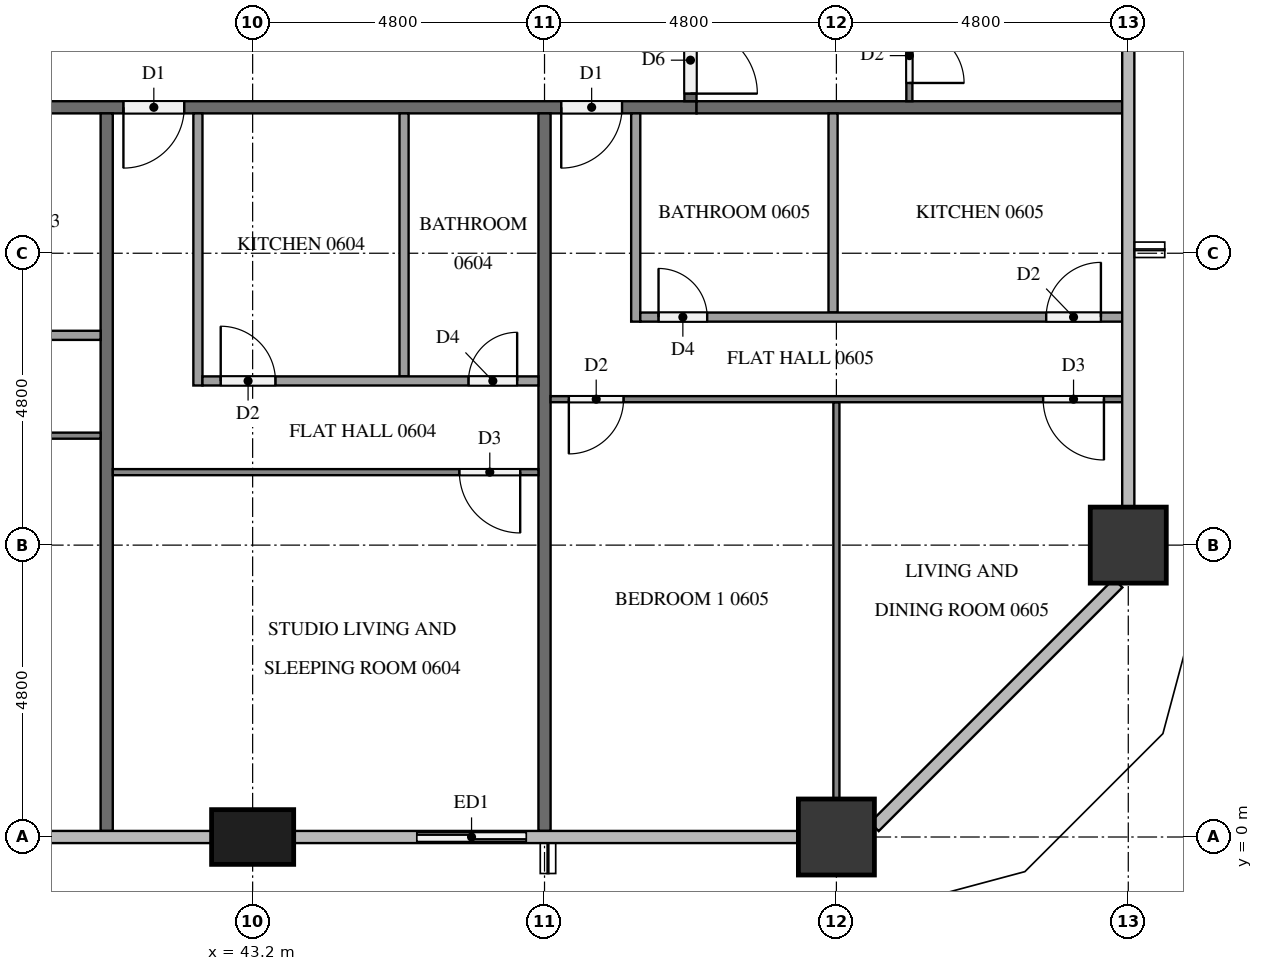
"""IFC4 building model, lengths in metres.
Left out: names, types, materials, properties, quantities, classifications, styles, units other than length and angle.
Written with IfcOpenShell. Run it as: python <this file> out.ifc"""

import sys

from ifc_helpers import new_model, si_unit, direction, frame, frame_2d, origin, origin_2d, place, context, subcontext, project, spatial, rectangle, extrude, element, fill, save


model = new_model("IFC4")
c1 = context("Model", 3, precision=1e-05, world=origin(), true_north=direction((0.0, 1.0)))
c2 = subcontext(c1, "Body", "Model", "MODEL_VIEW")
j1 = project(units=[si_unit("LENGTHUNIT", "METRE"), si_unit("PLANEANGLEUNIT", "RADIAN")], contexts=[c1])
p1 = place(None, origin())
s1 = spatial("IfcSite", under=j1, at=p1, CompositionType="ELEMENT")
p2 = place(p1, origin())
s2 = spatial("IfcBuilding", under=s1, at=p2, CompositionType="ELEMENT")
p3 = place(p2, frame((0.0, 0.0, 29.4)))
s3 = spatial("IfcBuildingStorey", under=s2, at=p3, CompositionType="ELEMENT", Elevation=29.4)
p4 = place(p3, frame((43.2, 0.0, 0.0), z_axis=(0.0, 0.0, 1.0), x_axis=(1.0, 0.0, 0.0)))
e1 = element("IfcColumn", 1, at=p4, inside=s3, PredefinedType="COLUMN", context=c2, shape_type="SweptSolid", body=[
    extrude(rectangle(XDim=1.35, YDim=0.9, at=origin_2d()), origin(), (0.0, 0.0, 1.0), 3.2),
])
for number, where, z_axis, x_axis in (
    (2, (52.8, 0.0, 0.0), (0.0, 0.0, 1.0), (1.0, 0.0, 0.0)),
    (3, (57.6, 4.8, 0.0), (0.0, 0.0, 1.0), (1.0, 0.0, 0.0)),
):
    element("IfcColumn", number, at=place(p3, frame(where, z_axis=z_axis, x_axis=x_axis)), inside=s3, PredefinedType="COLUMN", context=c2, shape_type="SweptSolid", body=[
        extrude(rectangle(XDim=1.25, YDim=1.25, at=origin_2d()), origin(), (0.0, 0.0, 1.0), 3.2),
    ])
p5 = place(p3, frame((45.6, 0.0, 0.0), z_axis=(0.0, 0.0, 1.0), x_axis=(1.0, 0.0, 0.0)))
e4 = element("IfcWall", 4, at=p5, inside=s3, PredefinedType="SOLIDWALL", context=c2, shape_type="SweptSolid", body=[
    extrude(rectangle(XDim=2.4, YDim=0.15, at=frame_2d((1.2, 0.0))), origin(), (0.0, 0.0, 1.0), 3.2),
])
p6 = place(p5, frame((0.3, 0.0, 0.0)))
e5 = element("IfcOpeningElement", 5, at=p6, cuts=e4, PredefinedType="OPENING", context=c2, shape_type="SweptSolid", body=[
    extrude(rectangle(XDim=1.8, YDim=2.4, at=frame_2d((0.9, 1.2))), frame((0.0, 0.085, 0.0), z_axis=(0.0, -1.0, 0.0), x_axis=(1.0, 0.0, 0.0)), (0.0, 0.0, 1.0), 0.17),
])
p7 = place(p3, frame((50.5, 12.0, 0.0), z_axis=(0.0, 0.0, 1.0), x_axis=(-1.0, 0.0, 0.0)))
e6 = element("IfcWall", 6, at=p7, inside=s3, PredefinedType="PARTITIONING", context=c2, shape_type="SweptSolid", body=[
    extrude(rectangle(XDim=38.6, YDim=0.2, at=frame_2d((19.3, 0.0))), origin(), (0.0, 0.0, 1.0), 3.2),
])
p8 = place(p7, frame((36.375, 0.0, 0.0)))
e7 = element("IfcOpeningElement", 7, at=p8, cuts=e6, PredefinedType="OPENING", context=c2, shape_type="SweptSolid", body=[
    extrude(rectangle(XDim=1.0, YDim=2.1, at=frame_2d((0.5, 1.05))), frame((0.0, 0.11, 0.0), z_axis=(0.0, -1.0, 0.0), x_axis=(1.0, 0.0, 0.0)), (0.0, 0.0, 1.0), 0.22),
])
p9 = place(p7, frame((34.825, 0.0, 0.0)))
e8 = element("IfcOpeningElement", 8, at=p9, cuts=e6, PredefinedType="OPENING", context=c2, shape_type="SweptSolid", body=[
    extrude(rectangle(XDim=1.0, YDim=2.1, at=frame_2d((0.5, 1.05))), frame((0.0, 0.11, 0.0), z_axis=(0.0, -1.0, 0.0), x_axis=(1.0, 0.0, 0.0)), (0.0, 0.0, 1.0), 0.22),
])
p10 = place(p7, frame((22.825, 0.0, 0.0)))
e9 = element("IfcOpeningElement", 9, at=p10, cuts=e6, PredefinedType="OPENING", context=c2, shape_type="SweptSolid", body=[
    extrude(rectangle(XDim=1.0, YDim=2.1, at=frame_2d((0.5, 1.05))), frame((0.0, 0.11, 0.0), z_axis=(0.0, -1.0, 0.0), x_axis=(1.0, 0.0, 0.0)), (0.0, 0.0, 1.0), 0.22),
])
p11 = place(p7, frame((8.425, 0.0, 0.0)))
e10 = element("IfcOpeningElement", 10, at=p11, cuts=e6, PredefinedType="OPENING", context=c2, shape_type="SweptSolid", body=[
    extrude(rectangle(XDim=1.0, YDim=2.1, at=frame_2d((0.5, 1.05))), frame((0.0, 0.11, 0.0), z_axis=(0.0, -1.0, 0.0), x_axis=(1.0, 0.0, 0.0)), (0.0, 0.0, 1.0), 0.22),
])
p12 = place(p7, frame((1.225, 0.0, 0.0)))
e11 = element("IfcOpeningElement", 11, at=p12, cuts=e6, PredefinedType="OPENING", context=c2, shape_type="SweptSolid", body=[
    extrude(rectangle(XDim=1.0, YDim=2.1, at=frame_2d((0.5, 1.05))), frame((0.0, 0.11, 0.0), z_axis=(0.0, -1.0, 0.0), x_axis=(1.0, 0.0, 0.0)), (0.0, 0.0, 1.0), 0.22),
])
p13 = place(p3, frame((50.4, 40.7, 0.0), z_axis=(0.0, 0.0, 1.0), x_axis=(0.0, -1.0, 0.0)))
e12 = element("IfcWall", 12, at=p13, inside=s3, PredefinedType="PARTITIONING", context=c2, shape_type="SweptSolid", body=[
    extrude(rectangle(XDim=28.6, YDim=0.2, at=frame_2d((14.3, 0.0))), origin(), (0.0, 0.0, 1.0), 3.2),
])
p14 = place(p13, frame((27.375, 0.0, 0.0)))
e13 = element("IfcOpeningElement", 13, at=p14, cuts=e12, PredefinedType="OPENING", context=c2, shape_type="SweptSolid", body=[
    extrude(rectangle(XDim=1.1, YDim=2.1, at=frame_2d((0.55, 1.05))), frame((0.0, 0.11, 0.0), z_axis=(0.0, -1.0, 0.0), x_axis=(1.0, 0.0, 0.0)), (0.0, 0.0, 1.0), 0.22),
])
p15 = place(p13, frame((8.225, 0.0, 0.0)))
e14 = element("IfcOpeningElement", 14, at=p15, cuts=e12, PredefinedType="OPENING", context=c2, shape_type="SweptSolid", body=[
    extrude(rectangle(XDim=1.0, YDim=2.1, at=frame_2d((0.5, 1.05))), frame((0.0, 0.11, 0.0), z_axis=(0.0, -1.0, 0.0), x_axis=(1.0, 0.0, 0.0)), (0.0, 0.0, 1.0), 0.22),
])
for number, where, z_axis, x_axis in (
    (15, (40.8, 11.9, 0.0), (0.0, 0.0, 1.0), (0.0, -1.0, 0.0)),
    (16, (48.0, 11.9, 0.0), (0.0, 0.0, 1.0), (0.0, -1.0, 0.0)),
):
    element("IfcWall", number, at=place(p3, frame(where, z_axis=z_axis, x_axis=x_axis)), inside=s3, PredefinedType="PARTITIONING", context=c2, shape_type="SweptSolid", body=[
        extrude(rectangle(XDim=11.8, YDim=0.2, at=frame_2d((5.9, 0.0))), origin(), (0.0, 0.0, 1.0), 3.2),
    ])
p16 = place(p3, frame((50.5, 12.0, 0.0), z_axis=(0.0, 0.0, 1.0), x_axis=(1.0, 0.0, 0.0)))
e17 = element("IfcWall", 17, at=p16, inside=s3, PredefinedType="PARTITIONING", context=c2, shape_type="SweptSolid", body=[
    extrude(rectangle(XDim=7.0, YDim=0.2, at=frame_2d((3.5, 0.0))), origin(), (0.0, 0.0, 1.0), 3.2),
])
p17 = place(p3, frame((40.7, 6.6, 0.0), z_axis=(0.0, 0.0, 1.0), x_axis=(-1.0, 0.0, 0.0)))
e18 = element("IfcWall", 18, at=p17, inside=s3, PredefinedType="PARTITIONING", context=c2, shape_type="SweptSolid", body=[
    extrude(rectangle(XDim=14.2, YDim=0.1, at=frame_2d((7.1, 0.0))), origin(), (0.0, 0.0, 1.0), 3.2),
])
p18 = place(p17, frame((13.0, 0.0, 0.0)))
e19 = element("IfcOpeningElement", 19, at=p18, cuts=e18, PredefinedType="OPENING", context=c2, shape_type="SweptSolid", body=[
    extrude(rectangle(XDim=0.9, YDim=2.1, at=frame_2d((0.45, 1.05))), frame((0.0, 0.06, 0.0), z_axis=(0.0, -1.0, 0.0), x_axis=(1.0, 0.0, 0.0)), (0.0, 0.0, 1.0), 0.12),
])
p19 = place(p17, frame((5.05, 0.0, 0.0)))
e20 = element("IfcOpeningElement", 20, at=p19, cuts=e18, PredefinedType="OPENING", context=c2, shape_type="SweptSolid", body=[
    extrude(rectangle(XDim=0.9, YDim=2.1, at=frame_2d((0.45, 1.05))), frame((0.0, 0.06, 0.0), z_axis=(0.0, -1.0, 0.0), x_axis=(1.0, 0.0, 0.0)), (0.0, 0.0, 1.0), 0.12),
])
p20 = place(p17, frame((3.35, 0.0, 0.0)))
e21 = element("IfcOpeningElement", 21, at=p20, cuts=e18, PredefinedType="OPENING", context=c2, shape_type="SweptSolid", body=[
    extrude(rectangle(XDim=1.0, YDim=2.1, at=frame_2d((0.5, 1.05))), frame((0.0, 0.06, 0.0), z_axis=(0.0, -1.0, 0.0), x_axis=(1.0, 0.0, 0.0)), (0.0, 0.0, 1.0), 0.12),
])
p21 = place(p3, frame((27.975, 8.25, 0.0), z_axis=(0.0, 0.0, 1.0), x_axis=(1.0, 0.0, 0.0)))
e22 = element("IfcWall", 22, at=p21, inside=s3, PredefinedType="PARTITIONING", context=c2, shape_type="SweptSolid", body=[
    extrude(rectangle(XDim=12.725, YDim=0.15, at=frame_2d((6.362, 0.0))), origin(), (0.0, 0.0, 1.0), 3.2),
])
p22 = place(p21, frame((0.3, 0.0, 0.0)))
e23 = element("IfcOpeningElement", 23, at=p22, cuts=e22, PredefinedType="OPENING", context=c2, shape_type="SweptSolid", body=[
    extrude(rectangle(XDim=0.9, YDim=2.1, at=frame_2d((0.45, 1.05))), frame((0.0, 0.085, 0.0), z_axis=(0.0, -1.0, 0.0), x_axis=(1.0, 0.0, 0.0)), (0.0, 0.0, 1.0), 0.17),
])
p23 = place(p21, frame((7.685, 0.0, 0.0)))
e24 = element("IfcOpeningElement", 24, at=p23, cuts=e22, PredefinedType="OPENING", context=c2, shape_type="SweptSolid", body=[
    extrude(rectangle(XDim=0.8, YDim=2.1, at=frame_2d((0.4, 1.05))), frame((0.0, 0.085, 0.0), z_axis=(0.0, -1.0, 0.0), x_axis=(1.0, 0.0, 0.0)), (0.0, 0.0, 1.0), 0.17),
])
p24 = place(p21, frame((9.135, 0.0, 0.0)))
e25 = element("IfcOpeningElement", 25, at=p24, cuts=e22, PredefinedType="OPENING", context=c2, shape_type="SweptSolid", body=[
    extrude(rectangle(XDim=0.9, YDim=2.1, at=frame_2d((0.45, 1.05))), frame((0.0, 0.085, 0.0), z_axis=(0.0, -1.0, 0.0), x_axis=(1.0, 0.0, 0.0)), (0.0, 0.0, 1.0), 0.17),
])
p25 = place(p3, frame((47.9, 6.0, 0.0), z_axis=(0.0, 0.0, 1.0), x_axis=(-1.0, 0.0, 0.0)))
e26 = element("IfcWall", 26, at=p25, inside=s3, PredefinedType="PARTITIONING", context=c2, shape_type="SweptSolid", body=[
    extrude(rectangle(XDim=7.0, YDim=0.1, at=frame_2d((3.5, 0.0))), origin(), (0.0, 0.0, 1.0), 3.2),
])
p26 = place(p25, frame((0.3, 0.0, 0.0)))
e27 = element("IfcOpeningElement", 27, at=p26, cuts=e26, PredefinedType="OPENING", context=c2, shape_type="SweptSolid", body=[
    extrude(rectangle(XDim=1.0, YDim=2.1, at=frame_2d((0.5, 1.05))), frame((0.0, 0.06, 0.0), z_axis=(0.0, -1.0, 0.0), x_axis=(1.0, 0.0, 0.0)), (0.0, 0.0, 1.0), 0.12),
])
p27 = place(p3, frame((45.69, 11.9, 0.0), z_axis=(0.0, 0.0, 1.0), x_axis=(0.0, -1.0, 0.0)))
e28 = element("IfcWall", 28, at=p27, inside=s3, PredefinedType="PARTITIONING", context=c2, shape_type="SweptSolid", body=[
    extrude(rectangle(XDim=4.325, YDim=0.15, at=frame_2d((2.163, 0.0))), origin(), (0.0, 0.0, 1.0), 3.2),
])
p28 = place(p3, frame((42.3, 11.9, 0.0), z_axis=(0.0, 0.0, 1.0), x_axis=(0.0, -1.0, 0.0)))
e29 = element("IfcWall", 29, at=p28, inside=s3, PredefinedType="PARTITIONING", context=c2, shape_type="SweptSolid", body=[
    extrude(rectangle(XDim=4.475, YDim=0.15, at=frame_2d((2.237, 0.0))), origin(), (0.0, 0.0, 1.0), 3.2),
])
p29 = place(p3, frame((42.375, 7.5, 0.0), z_axis=(0.0, 0.0, 1.0), x_axis=(1.0, 0.0, 0.0)))
e30 = element("IfcWall", 30, at=p29, inside=s3, PredefinedType="PARTITIONING", context=c2, shape_type="SweptSolid", body=[
    extrude(rectangle(XDim=5.525, YDim=0.15, at=frame_2d((2.762, 0.0))), origin(), (0.0, 0.0, 1.0), 3.2),
])
p30 = place(p29, frame((0.3, 0.0, 0.0)))
e31 = element("IfcOpeningElement", 31, at=p30, cuts=e30, PredefinedType="OPENING", context=c2, shape_type="SweptSolid", body=[
    extrude(rectangle(XDim=0.9, YDim=2.1, at=frame_2d((0.45, 1.05))), frame((0.0, 0.085, 0.0), z_axis=(0.0, -1.0, 0.0), x_axis=(1.0, 0.0, 0.0)), (0.0, 0.0, 1.0), 0.17),
])
p31 = place(p29, frame((4.375, 0.0, 0.0)))
e32 = element("IfcOpeningElement", 32, at=p31, cuts=e30, PredefinedType="OPENING", context=c2, shape_type="SweptSolid", body=[
    extrude(rectangle(XDim=0.8, YDim=2.1, at=frame_2d((0.4, 1.05))), frame((0.0, 0.085, 0.0), z_axis=(0.0, -1.0, 0.0), x_axis=(1.0, 0.0, 0.0)), (0.0, 0.0, 1.0), 0.17),
])
p32 = place(p3, frame((52.8, 7.15, 0.0), z_axis=(0.0, 0.0, 1.0), x_axis=(0.0, -1.0, 0.0)))
e33 = element("IfcWall", 33, at=p32, inside=s3, PredefinedType="PARTITIONING", context=c2, shape_type="SweptSolid", body=[
    extrude(rectangle(XDim=6.525, YDim=0.1, at=frame_2d((3.262, 0.0))), origin(), (0.0, 0.0, 1.0), 3.2),
])
p33 = place(p3, frame((57.5, 7.2, 0.0), z_axis=(0.0, 0.0, 1.0), x_axis=(-1.0, 0.0, 0.0)))
e34 = element("IfcWall", 34, at=p33, inside=s3, PredefinedType="PARTITIONING", context=c2, shape_type="SweptSolid", body=[
    extrude(rectangle(XDim=9.4, YDim=0.1, at=frame_2d((4.7, 0.0))), origin(), (0.0, 0.0, 1.0), 3.2),
])
p34 = place(p33, frame((8.2, 0.0, 0.0)))
e35 = element("IfcOpeningElement", 35, at=p34, cuts=e34, PredefinedType="OPENING", context=c2, shape_type="SweptSolid", body=[
    extrude(rectangle(XDim=0.9, YDim=2.1, at=frame_2d((0.45, 1.05))), frame((0.0, 0.06, 0.0), z_axis=(0.0, -1.0, 0.0), x_axis=(1.0, 0.0, 0.0)), (0.0, 0.0, 1.0), 0.12),
])
p35 = place(p33, frame((0.3, 0.0, 0.0)))
e36 = element("IfcOpeningElement", 36, at=p35, cuts=e34, PredefinedType="OPENING", context=c2, shape_type="SweptSolid", body=[
    extrude(rectangle(XDim=1.0, YDim=2.1, at=frame_2d((0.5, 1.05))), frame((0.0, 0.06, 0.0), z_axis=(0.0, -1.0, 0.0), x_axis=(1.0, 0.0, 0.0)), (0.0, 0.0, 1.0), 0.12),
])
p36 = place(p3, frame((52.745, 11.9, 0.0), z_axis=(0.0, 0.0, 1.0), x_axis=(0.0, -1.0, 0.0)))
e37 = element("IfcWall", 37, at=p36, inside=s3, PredefinedType="PARTITIONING", context=c2, shape_type="SweptSolid", body=[
    extrude(rectangle(XDim=3.275, YDim=0.15, at=frame_2d((1.637, 0.0))), origin(), (0.0, 0.0, 1.0), 3.2),
])
p37 = place(p3, frame((49.5, 11.9, 0.0), z_axis=(0.0, 0.0, 1.0), x_axis=(0.0, -1.0, 0.0)))
e38 = element("IfcWall", 38, at=p37, inside=s3, PredefinedType="PARTITIONING", context=c2, shape_type="SweptSolid", body=[
    extrude(rectangle(XDim=3.425, YDim=0.15, at=frame_2d((1.712, 0.0))), origin(), (0.0, 0.0, 1.0), 3.2),
])
p38 = place(p3, frame((49.575, 8.55, 0.0), z_axis=(0.0, 0.0, 1.0), x_axis=(1.0, 0.0, 0.0)))
e39 = element("IfcWall", 39, at=p38, inside=s3, PredefinedType="PARTITIONING", context=c2, shape_type="SweptSolid", body=[
    extrude(rectangle(XDim=7.925, YDim=0.15, at=frame_2d((3.962, 0.0))), origin(), (0.0, 0.0, 1.0), 3.2),
])
p39 = place(p38, frame((0.3, 0.0, 0.0)))
e40 = element("IfcOpeningElement", 40, at=p39, cuts=e39, PredefinedType="OPENING", context=c2, shape_type="SweptSolid", body=[
    extrude(rectangle(XDim=0.8, YDim=2.1, at=frame_2d((0.4, 1.05))), frame((0.0, 0.085, 0.0), z_axis=(0.0, -1.0, 0.0), x_axis=(1.0, 0.0, 0.0)), (0.0, 0.0, 1.0), 0.17),
])
p40 = place(p38, frame((6.675, 0.0, 0.0)))
e41 = element("IfcOpeningElement", 41, at=p40, cuts=e39, PredefinedType="OPENING", context=c2, shape_type="SweptSolid", body=[
    extrude(rectangle(XDim=0.9, YDim=2.1, at=frame_2d((0.45, 1.05))), frame((0.0, 0.085, 0.0), z_axis=(0.0, -1.0, 0.0), x_axis=(1.0, 0.0, 0.0)), (0.0, 0.0, 1.0), 0.17),
])
p41 = place(p3, frame((54.0, 31.1, 0.0), z_axis=(0.0, 0.0, 1.0), x_axis=(0.0, -1.0, 0.0)))
e42 = element("IfcWall", 42, at=p41, inside=s3, PredefinedType="PARTITIONING", context=c2, shape_type="SweptSolid", body=[
    extrude(rectangle(XDim=19.0, YDim=0.1, at=frame_2d((9.5, 0.0))), origin(), (0.0, 0.0, 1.0), 3.2),
])
p42 = place(p41, frame((17.8, 0.0, 0.0)))
e43 = element("IfcOpeningElement", 43, at=p42, cuts=e42, PredefinedType="OPENING", context=c2, shape_type="SweptSolid", body=[
    extrude(rectangle(XDim=0.9, YDim=2.1, at=frame_2d((0.45, 1.05))), frame((0.0, 0.06, 0.0), z_axis=(0.0, -1.0, 0.0), x_axis=(1.0, 0.0, 0.0)), (0.0, 0.0, 1.0), 0.12),
])
p43 = place(p41, frame((9.85, 0.0, 0.0)))
e44 = element("IfcOpeningElement", 44, at=p43, cuts=e42, PredefinedType="OPENING", context=c2, shape_type="SweptSolid", body=[
    extrude(rectangle(XDim=0.9, YDim=2.1, at=frame_2d((0.45, 1.05))), frame((0.0, 0.06, 0.0), z_axis=(0.0, -1.0, 0.0), x_axis=(1.0, 0.0, 0.0)), (0.0, 0.0, 1.0), 0.12),
])
p44 = place(p41, frame((8.15, 0.0, 0.0)))
e45 = element("IfcOpeningElement", 45, at=p44, cuts=e42, PredefinedType="OPENING", context=c2, shape_type="SweptSolid", body=[
    extrude(rectangle(XDim=1.0, YDim=2.1, at=frame_2d((0.5, 1.05))), frame((0.0, 0.06, 0.0), z_axis=(0.0, -1.0, 0.0), x_axis=(1.0, 0.0, 0.0)), (0.0, 0.0, 1.0), 0.12),
])
p45 = place(p41, frame((0.3, 0.0, 0.0)))
e46 = element("IfcOpeningElement", 46, at=p45, cuts=e42, PredefinedType="OPENING", context=c2, shape_type="SweptSolid", body=[
    extrude(rectangle(XDim=0.9, YDim=2.1, at=frame_2d((0.45, 1.05))), frame((0.0, 0.06, 0.0), z_axis=(0.0, -1.0, 0.0), x_axis=(1.0, 0.0, 0.0)), (0.0, 0.0, 1.0), 0.12),
])
p46 = place(p6, origin())
e47 = element("IfcDoor", 47, at=p46, inside=s3, OperationType="SLIDING_TO_LEFT", PredefinedType="DOOR", context=c2, shape_type="SweptSolid", body=[
    extrude(rectangle(XDim=1.8, YDim=2.4, at=frame_2d((0.9, 1.2))), frame((0.0, 0.025, 0.0), z_axis=(0.0, -1.0, 0.0), x_axis=(1.0, 0.0, 0.0)), (0.0, 0.0, 1.0), 0.05),
])
fill(e5, e47)
p47 = place(p11, origin())
e48 = element("IfcDoor", 48, at=p47, inside=s3, OperationType="SINGLE_SWING_RIGHT", PredefinedType="DOOR", context=c2, shape_type="SweptSolid", body=[
    extrude(rectangle(XDim=1.0, YDim=2.1, at=frame_2d((0.5, 1.05))), frame((0.0, 0.025, 0.0), z_axis=(0.0, -1.0, 0.0), x_axis=(1.0, 0.0, 0.0)), (0.0, 0.0, 1.0), 0.05),
])
fill(e10, e48)
p48 = place(p12, origin())
e49 = element("IfcDoor", 49, at=p48, inside=s3, OperationType="SINGLE_SWING_RIGHT", PredefinedType="DOOR", context=c2, shape_type="SweptSolid", body=[
    extrude(rectangle(XDim=1.0, YDim=2.1, at=frame_2d((0.5, 1.05))), frame((0.0, 0.025, 0.0), z_axis=(0.0, -1.0, 0.0), x_axis=(1.0, 0.0, 0.0)), (0.0, 0.0, 1.0), 0.05),
])
fill(e11, e49)
p49 = place(p14, origin())
e50 = element("IfcDoor", 50, at=p49, inside=s3, OperationType="SINGLE_SWING_RIGHT", PredefinedType="DOOR", context=c2, shape_type="SweptSolid", body=[
    extrude(rectangle(XDim=1.1, YDim=2.1, at=frame_2d((0.55, 1.05))), frame((0.0, 0.025, 0.0), z_axis=(0.0, -1.0, 0.0), x_axis=(1.0, 0.0, 0.0)), (0.0, 0.0, 1.0), 0.05),
])
fill(e13, e50)
p50 = place(p26, origin())
e51 = element("IfcDoor", 51, at=p50, inside=s3, OperationType="SINGLE_SWING_LEFT", PredefinedType="DOOR", context=c2, shape_type="SweptSolid", body=[
    extrude(rectangle(XDim=1.0, YDim=2.1, at=frame_2d((0.5, 1.05))), frame((0.0, 0.025, 0.0), z_axis=(0.0, -1.0, 0.0), x_axis=(1.0, 0.0, 0.0)), (0.0, 0.0, 1.0), 0.05),
])
fill(e27, e51)
p51 = place(p30, origin())
e52 = element("IfcDoor", 52, at=p51, inside=s3, OperationType="SINGLE_SWING_LEFT", PredefinedType="DOOR", context=c2, shape_type="SweptSolid", body=[
    extrude(rectangle(XDim=0.9, YDim=2.1, at=frame_2d((0.45, 1.05))), frame((0.0, 0.025, 0.0), z_axis=(0.0, -1.0, 0.0), x_axis=(1.0, 0.0, 0.0)), (0.0, 0.0, 1.0), 0.05),
])
fill(e31, e52)
p52 = place(p31, origin())
e53 = element("IfcDoor", 53, at=p52, inside=s3, OperationType="SINGLE_SWING_RIGHT", PredefinedType="DOOR", context=c2, shape_type="SweptSolid", body=[
    extrude(rectangle(XDim=0.8, YDim=2.1, at=frame_2d((0.4, 1.05))), frame((0.0, 0.025, 0.0), z_axis=(0.0, -1.0, 0.0), x_axis=(1.0, 0.0, 0.0)), (0.0, 0.0, 1.0), 0.05),
])
fill(e32, e53)
p53 = place(p34, origin())
e54 = element("IfcDoor", 54, at=p53, inside=s3, OperationType="SINGLE_SWING_RIGHT", PredefinedType="DOOR", context=c2, shape_type="SweptSolid", body=[
    extrude(rectangle(XDim=0.9, YDim=2.1, at=frame_2d((0.45, 1.05))), frame((0.0, 0.025, 0.0), z_axis=(0.0, -1.0, 0.0), x_axis=(1.0, 0.0, 0.0)), (0.0, 0.0, 1.0), 0.05),
])
fill(e35, e54)
p54 = place(p35, origin())
e55 = element("IfcDoor", 55, at=p54, inside=s3, OperationType="SINGLE_SWING_LEFT", PredefinedType="DOOR", context=c2, shape_type="SweptSolid", body=[
    extrude(rectangle(XDim=1.0, YDim=2.1, at=frame_2d((0.5, 1.05))), frame((0.0, 0.025, 0.0), z_axis=(0.0, -1.0, 0.0), x_axis=(1.0, 0.0, 0.0)), (0.0, 0.0, 1.0), 0.05),
])
fill(e36, e55)
p55 = place(p39, origin())
e56 = element("IfcDoor", 56, at=p55, inside=s3, OperationType="SINGLE_SWING_LEFT", PredefinedType="DOOR", context=c2, shape_type="SweptSolid", body=[
    extrude(rectangle(XDim=0.8, YDim=2.1, at=frame_2d((0.4, 1.05))), frame((0.0, 0.025, 0.0), z_axis=(0.0, -1.0, 0.0), x_axis=(1.0, 0.0, 0.0)), (0.0, 0.0, 1.0), 0.05),
])
fill(e40, e56)
p56 = place(p40, origin())
e57 = element("IfcDoor", 57, at=p56, inside=s3, OperationType="SINGLE_SWING_RIGHT", PredefinedType="DOOR", context=c2, shape_type="SweptSolid", body=[
    extrude(rectangle(XDim=0.9, YDim=2.1, at=frame_2d((0.45, 1.05))), frame((0.0, 0.025, 0.0), z_axis=(0.0, -1.0, 0.0), x_axis=(1.0, 0.0, 0.0)), (0.0, 0.0, 1.0), 0.05),
])
fill(e41, e57)
p57 = place(p42, origin())
e58 = element("IfcDoor", 58, at=p57, inside=s3, OperationType="SINGLE_SWING_RIGHT", PredefinedType="DOOR", context=c2, shape_type="SweptSolid", body=[
    extrude(rectangle(XDim=0.9, YDim=2.1, at=frame_2d((0.45, 1.05))), frame((0.0, 0.025, 0.0), z_axis=(0.0, -1.0, 0.0), x_axis=(1.0, 0.0, 0.0)), (0.0, 0.0, 1.0), 0.05),
])
fill(e43, e58)
save(model, sys.argv[1])
